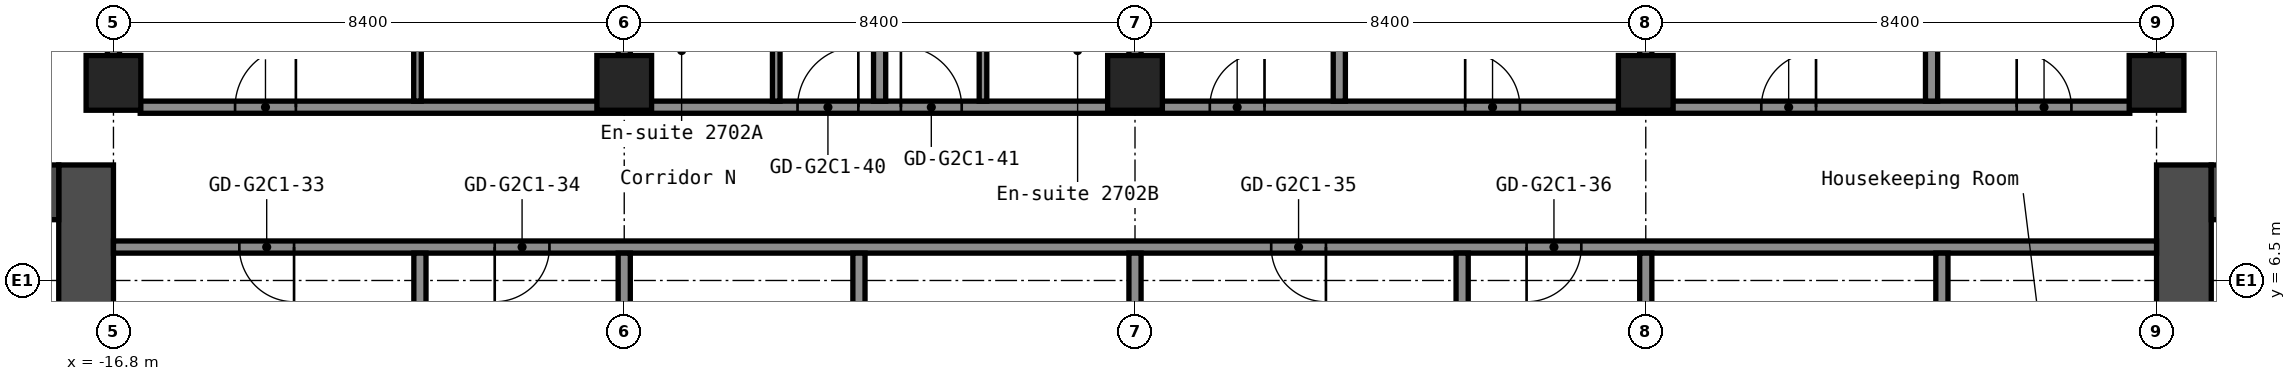
"""IFC4 building model, lengths in metres.
Left out: names, types, materials, properties, quantities, classifications, styles, units other than length and angle.
Written with IfcOpenShell. Run it as: python <this file> out.ifc"""

import sys

from ifc_helpers import new_model, si_unit, direction, frame, frame_2d, origin, origin_2d, place, context, subcontext, project, spatial, rectangle, hollow_rectangle, extrude, element, fill, save


model = new_model("IFC4")
c1 = context("Model", 3, precision=1e-05, world=origin(), true_north=direction((0.0, 1.0)))
c2 = subcontext(c1, "Body", "Model", "MODEL_VIEW")
j1 = project(units=[si_unit("LENGTHUNIT", "METRE"), si_unit("PLANEANGLEUNIT", "RADIAN")], contexts=[c1])
p1 = place(None, origin())
s1 = spatial("IfcSite", under=j1, at=p1, CompositionType="ELEMENT")
p2 = place(p1, origin())
s2 = spatial("IfcBuilding", under=s1, at=p2, CompositionType="ELEMENT")
p3 = place(p2, frame((0.0, 0.0, 97.8)))
s3 = spatial("IfcBuildingStorey", under=s2, at=p3, CompositionType="ELEMENT", Elevation=97.8)
for number, where, z_axis, x_axis in (
    (1, (-16.8, 9.75, 0.0), (0.0, 0.0, 1.0), (1.0, 0.0, 0.0)),
    (2, (-8.4, 9.75, 0.0), (0.0, 0.0, 1.0), (1.0, 0.0, 0.0)),
    (3, (0.0, 9.75, 0.0), (0.0, 0.0, 1.0), (1.0, 0.0, 0.0)),
    (4, (8.4, 9.75, 0.0), (0.0, 0.0, 1.0), (1.0, 0.0, 0.0)),
    (5, (16.8, 9.75, 0.0), (0.0, 0.0, 1.0), (1.0, 0.0, 0.0)),
):
    element("IfcColumn", number, at=place(p3, frame(where, z_axis=z_axis, x_axis=x_axis)), inside=s3, PredefinedType="COLUMN", context=c2, shape_type="SweptSolid", body=[
        extrude(hollow_rectangle(XDim=0.9, YDim=0.9, WallThickness=0.036, at=origin_2d()), origin(), (0.0, 0.0, 1.0), 2.8),
    ])
p4 = place(p3, frame((-17.25, -8.4, 0.0), z_axis=(0.0, 0.0, 1.0), x_axis=(0.0, 1.0, 0.0)))
e6 = element("IfcWall", 6, at=p4, inside=s3, PredefinedType="SHEAR", context=c2, shape_type="SweptSolid", body=[
    extrude(rectangle(XDim=16.8, YDim=0.9, at=frame_2d((8.4, 0.0))), origin(), (0.0, 0.0, 1.0), 2.8),
])
p5 = place(p4, frame((7.6, 0.0, 0.0)))
e7 = element("IfcOpeningElement", 7, at=p5, cuts=e6, PredefinedType="OPENING", context=c2, shape_type="SweptSolid", body=[
    extrude(rectangle(XDim=1.2, YDim=2.1, at=frame_2d((0.6, 1.05))), frame((0.0, 0.46, 0.0), z_axis=(0.0, -1.0, 0.0), x_axis=(1.0, 0.0, 0.0)), (0.0, 0.0, 1.0), 0.92),
])
p6 = place(p3, frame((-32.7, 7.95, 0.0), z_axis=(0.0, 0.0, 1.0), x_axis=(1.0, 0.0, 0.0)))
e8 = element("IfcWall", 8, at=p6, inside=s3, PredefinedType="SHEAR", context=c2, shape_type="SweptSolid", body=[
    extrude(rectangle(XDim=15.0, YDim=0.9, at=frame_2d((7.5, 0.0))), origin(), (0.0, 0.0, 1.0), 2.8),
])
p7 = place(p6, frame((3.4, 0.0, 0.0)))
e9 = element("IfcOpeningElement", 9, at=p7, cuts=e8, PredefinedType="OPENING", context=c2, shape_type="SweptSolid", body=[
    extrude(rectangle(XDim=1.2, YDim=2.1, at=frame_2d((0.6, 1.05))), frame((0.0, 0.46, 0.0), z_axis=(0.0, -1.0, 0.0), x_axis=(1.0, 0.0, 0.0)), (0.0, 0.0, 1.0), 0.92),
])
p8 = place(p6, frame((0.75, 0.0, 0.0)))
e10 = element("IfcOpeningElement", 10, at=p8, cuts=e8, PredefinedType="OPENING", context=c2, shape_type="SweptSolid", body=[
    extrude(rectangle(XDim=0.9, YDim=2.1, at=frame_2d((0.45, 1.05))), frame((0.0, 0.46, 0.0), z_axis=(0.0, -1.0, 0.0), x_axis=(1.0, 0.0, 0.0)), (0.0, 0.0, 1.0), 0.92),
])
p9 = place(p3, frame((17.25, -8.4, 0.0), z_axis=(0.0, 0.0, 1.0), x_axis=(0.0, 1.0, 0.0)))
e11 = element("IfcWall", 11, at=p9, inside=s3, PredefinedType="SHEAR", context=c2, shape_type="SweptSolid", body=[
    extrude(rectangle(XDim=16.8, YDim=0.9, at=frame_2d((8.4, 0.0))), origin(), (0.0, 0.0, 1.0), 2.8),
])
p10 = place(p9, frame((7.6, 0.0, 0.0)))
e12 = element("IfcOpeningElement", 12, at=p10, cuts=e11, PredefinedType="OPENING", context=c2, shape_type="SweptSolid", body=[
    extrude(rectangle(XDim=1.2, YDim=2.1, at=frame_2d((0.6, 1.05))), frame((0.0, 0.46, 0.0), z_axis=(0.0, -1.0, 0.0), x_axis=(1.0, 0.0, 0.0)), (0.0, 0.0, 1.0), 0.92),
])
p11 = place(p3, frame((17.7, 7.95, 0.0), z_axis=(0.0, 0.0, 1.0), x_axis=(1.0, 0.0, 0.0)))
e13 = element("IfcWall", 13, at=p11, inside=s3, PredefinedType="SHEAR", context=c2, shape_type="SweptSolid", body=[
    extrude(rectangle(XDim=15.0, YDim=0.9, at=frame_2d((7.5, 0.0))), origin(), (0.0, 0.0, 1.0), 2.8),
])
p12 = place(p11, frame((10.4, 0.0, 0.0)))
e14 = element("IfcOpeningElement", 14, at=p12, cuts=e13, PredefinedType="OPENING", context=c2, shape_type="SweptSolid", body=[
    extrude(rectangle(XDim=1.2, YDim=2.1, at=frame_2d((0.6, 1.05))), frame((0.0, 0.46, 0.0), z_axis=(0.0, -1.0, 0.0), x_axis=(1.0, 0.0, 0.0)), (0.0, 0.0, 1.0), 0.92),
])
p13 = place(p11, frame((13.35, 0.0, 0.0)))
e15 = element("IfcOpeningElement", 15, at=p13, cuts=e13, PredefinedType="OPENING", context=c2, shape_type="SweptSolid", body=[
    extrude(rectangle(XDim=0.9, YDim=2.1, at=frame_2d((0.45, 1.05))), frame((0.0, 0.46, 0.0), z_axis=(0.0, -1.0, 0.0), x_axis=(1.0, 0.0, 0.0)), (0.0, 0.0, 1.0), 0.92),
])
p14 = place(p3, frame((-16.8, 7.05, 0.0), z_axis=(0.0, 0.0, 1.0), x_axis=(1.0, 0.0, 0.0)))
e16 = element("IfcWall", 16, at=p14, inside=s3, PredefinedType="PARTITIONING", context=c2, shape_type="SweptSolid", body=[
    extrude(rectangle(XDim=33.6, YDim=0.2, at=frame_2d((16.8, 0.0))), origin(), (0.0, 0.0, 1.0), 2.8),
])
p15 = place(p14, frame((2.07, 0.0, 0.0)))
e17 = element("IfcOpeningElement", 17, at=p15, cuts=e16, PredefinedType="OPENING", context=c2, shape_type="SweptSolid", body=[
    extrude(rectangle(XDim=0.9, YDim=2.1, at=frame_2d((0.45, 1.05))), frame((0.0, 0.11, 0.0), z_axis=(0.0, -1.0, 0.0), x_axis=(1.0, 0.0, 0.0)), (0.0, 0.0, 1.0), 0.22),
])
p16 = place(p14, frame((6.27, 0.0, 0.0)))
e18 = element("IfcOpeningElement", 18, at=p16, cuts=e16, PredefinedType="OPENING", context=c2, shape_type="SweptSolid", body=[
    extrude(rectangle(XDim=0.9, YDim=2.1, at=frame_2d((0.45, 1.05))), frame((0.0, 0.11, 0.0), z_axis=(0.0, -1.0, 0.0), x_axis=(1.0, 0.0, 0.0)), (0.0, 0.0, 1.0), 0.22),
])
p17 = place(p14, frame((19.04, 0.0, 0.0)))
e19 = element("IfcOpeningElement", 19, at=p17, cuts=e16, PredefinedType="OPENING", context=c2, shape_type="SweptSolid", body=[
    extrude(rectangle(XDim=0.9, YDim=2.1, at=frame_2d((0.45, 1.05))), frame((0.0, 0.11, 0.0), z_axis=(0.0, -1.0, 0.0), x_axis=(1.0, 0.0, 0.0)), (0.0, 0.0, 1.0), 0.22),
])
p18 = place(p14, frame((23.24, 0.0, 0.0)))
e20 = element("IfcOpeningElement", 20, at=p18, cuts=e16, PredefinedType="OPENING", context=c2, shape_type="SweptSolid", body=[
    extrude(rectangle(XDim=0.9, YDim=2.1, at=frame_2d((0.45, 1.05))), frame((0.0, 0.11, 0.0), z_axis=(0.0, -1.0, 0.0), x_axis=(1.0, 0.0, 0.0)), (0.0, 0.0, 1.0), 0.22),
])
p19 = place(p3, frame((-16.36, 9.35, 0.0), z_axis=(0.0, 0.0, 1.0), x_axis=(1.0, 0.0, 0.0)))
e21 = element("IfcWall", 21, at=p19, inside=s3, PredefinedType="PARTITIONING", context=c2, shape_type="SweptSolid", body=[
    extrude(rectangle(XDim=32.72, YDim=0.2, at=frame_2d((16.36, 0.0))), origin(), (0.0, 0.0, 1.0), 2.8),
])
p20 = place(p19, frame((1.56, 0.0, 0.0)))
e22 = element("IfcOpeningElement", 22, at=p20, cuts=e21, PredefinedType="OPENING", context=c2, shape_type="SweptSolid", body=[
    extrude(rectangle(XDim=1.0, YDim=2.1, at=frame_2d((0.5, 1.05))), frame((0.0, 0.11, 0.0), z_axis=(0.0, -1.0, 0.0), x_axis=(1.0, 0.0, 0.0)), (0.0, 0.0, 1.0), 0.22),
])
p21 = place(p19, frame((10.81, 0.0, 0.0)))
e23 = element("IfcOpeningElement", 23, at=p21, cuts=e21, PredefinedType="OPENING", context=c2, shape_type="SweptSolid", body=[
    extrude(rectangle(XDim=1.0, YDim=2.1, at=frame_2d((0.5, 1.05))), frame((0.0, 0.11, 0.0), z_axis=(0.0, -1.0, 0.0), x_axis=(1.0, 0.0, 0.0)), (0.0, 0.0, 1.0), 0.22),
])
p22 = place(p19, frame((12.51, 0.0, 0.0)))
e24 = element("IfcOpeningElement", 24, at=p22, cuts=e21, PredefinedType="OPENING", context=c2, shape_type="SweptSolid", body=[
    extrude(rectangle(XDim=1.0, YDim=2.1, at=frame_2d((0.5, 1.05))), frame((0.0, 0.11, 0.0), z_axis=(0.0, -1.0, 0.0), x_axis=(1.0, 0.0, 0.0)), (0.0, 0.0, 1.0), 0.22),
])
p23 = place(p19, frame((17.59, 0.0, 0.0)))
e25 = element("IfcOpeningElement", 25, at=p23, cuts=e21, PredefinedType="OPENING", context=c2, shape_type="SweptSolid", body=[
    extrude(rectangle(XDim=0.9, YDim=2.1, at=frame_2d((0.45, 1.05))), frame((0.0, 0.11, 0.0), z_axis=(0.0, -1.0, 0.0), x_axis=(1.0, 0.0, 0.0)), (0.0, 0.0, 1.0), 0.22),
])
p24 = place(p19, frame((21.79, 0.0, 0.0)))
e26 = element("IfcOpeningElement", 26, at=p24, cuts=e21, PredefinedType="OPENING", context=c2, shape_type="SweptSolid", body=[
    extrude(rectangle(XDim=0.9, YDim=2.1, at=frame_2d((0.45, 1.05))), frame((0.0, 0.11, 0.0), z_axis=(0.0, -1.0, 0.0), x_axis=(1.0, 0.0, 0.0)), (0.0, 0.0, 1.0), 0.22),
])
p25 = place(p19, frame((26.66, 0.0, 0.0)))
e27 = element("IfcOpeningElement", 27, at=p25, cuts=e21, PredefinedType="OPENING", context=c2, shape_type="SweptSolid", body=[
    extrude(rectangle(XDim=0.9, YDim=2.1, at=frame_2d((0.45, 1.05))), frame((0.0, 0.11, 0.0), z_axis=(0.0, -1.0, 0.0), x_axis=(1.0, 0.0, 0.0)), (0.0, 0.0, 1.0), 0.22),
])
p26 = place(p19, frame((30.86, 0.0, 0.0)))
e28 = element("IfcOpeningElement", 28, at=p26, cuts=e21, PredefinedType="OPENING", context=c2, shape_type="SweptSolid", body=[
    extrude(rectangle(XDim=0.9, YDim=2.1, at=frame_2d((0.45, 1.05))), frame((0.0, 0.11, 0.0), z_axis=(0.0, -1.0, 0.0), x_axis=(1.0, 0.0, 0.0)), (0.0, 0.0, 1.0), 0.22),
])
p27 = place(p3, frame((-16.8, 10.19, 0.0), z_axis=(0.0, 0.0, 1.0), x_axis=(0.0, 1.0, 0.0)))
e29 = element("IfcWall", 29, at=p27, inside=s3, PredefinedType="PARTITIONING", context=c2, shape_type="SweptSolid", body=[
    extrude(rectangle(XDim=13.36, YDim=0.2, at=frame_2d((6.68, 0.0))), origin(), (0.0, 0.0, 1.0), 2.8),
])
p28 = place(p3, frame((-11.8, 9.45, 0.0), z_axis=(0.0, 0.0, 1.0), x_axis=(0.0, 1.0, 0.0)))
e30 = element("IfcWall", 30, at=p28, inside=s3, PredefinedType="PARTITIONING", context=c2, shape_type="SweptSolid", body=[
    extrude(rectangle(XDim=3.3, YDim=0.125, at=frame_2d((1.65, 0.0))), origin(), (0.0, 0.0, 1.0), 2.8),
])
for number, where, z_axis, x_axis in (
    (31, (-11.76, 1.05, 0.0), (0.0, 0.0, 1.0), (0.0, 1.0, 0.0)),
    (32, (-8.4, 1.05, 0.0), (0.0, 0.0, 1.0), (0.0, 1.0, 0.0)),
):
    element("IfcWall", number, at=place(p3, frame(where, z_axis=z_axis, x_axis=x_axis)), inside=s3, PredefinedType="PARTITIONING", context=c2, shape_type="SweptSolid", body=[
        extrude(rectangle(XDim=5.9, YDim=0.2, at=frame_2d((2.95, 0.0))), origin(), (0.0, 0.0, 1.0), 2.8),
    ])
p29 = place(p3, frame((-8.4, 10.19, 0.0), z_axis=(0.0, 0.0, 1.0), x_axis=(0.0, 1.0, 0.0)))
e33 = element("IfcWall", 33, at=p29, inside=s3, PredefinedType="PARTITIONING", context=c2, shape_type="SweptSolid", body=[
    extrude(rectangle(XDim=13.36, YDim=0.2, at=frame_2d((6.68, 0.0))), origin(), (0.0, 0.0, 1.0), 2.8),
])
p30 = place(p3, frame((-5.9, 9.45, 0.0), z_axis=(0.0, 0.0, 1.0), x_axis=(0.0, 1.0, 0.0)))
e34 = element("IfcWall", 34, at=p30, inside=s3, PredefinedType="PARTITIONING", context=c2, shape_type="SweptSolid", body=[
    extrude(rectangle(XDim=2.9, YDim=0.125, at=frame_2d((1.45, 0.0))), origin(), (0.0, 0.0, 1.0), 2.8),
])
p31 = place(p30, frame((1.5, 0.0, 0.0)))
e35 = element("IfcOpeningElement", 35, at=p31, cuts=e34, PredefinedType="OPENING", context=c2, shape_type="SweptSolid", body=[
    extrude(rectangle(XDim=0.8, YDim=2.1, at=frame_2d((0.4, 1.05))), frame((0.0, 0.073, 0.0), z_axis=(0.0, -1.0, 0.0), x_axis=(1.0, 0.0, 0.0)), (0.0, 0.0, 1.0), 0.145),
])
p32 = place(p3, frame((-4.54, 1.05, 0.0), z_axis=(0.0, 0.0, 1.0), x_axis=(0.0, 1.0, 0.0)))
e36 = element("IfcWall", 36, at=p32, inside=s3, PredefinedType="PARTITIONING", context=c2, shape_type="SweptSolid", body=[
    extrude(rectangle(XDim=5.9, YDim=0.2, at=frame_2d((2.95, 0.0))), origin(), (0.0, 0.0, 1.0), 2.8),
])
p33 = place(p3, frame((-4.2, 9.45, 0.0), z_axis=(0.0, 0.0, 1.0), x_axis=(0.0, 1.0, 0.0)))
e37 = element("IfcWall", 37, at=p33, inside=s3, PredefinedType="PARTITIONING", context=c2, shape_type="SweptSolid", body=[
    extrude(rectangle(XDim=14.1, YDim=0.2, at=frame_2d((7.05, 0.0))), origin(), (0.0, 0.0, 1.0), 2.8),
])
p34 = place(p3, frame((-2.5, 9.45, 0.0), z_axis=(0.0, 0.0, 1.0), x_axis=(0.0, 1.0, 0.0)))
e38 = element("IfcWall", 38, at=p34, inside=s3, PredefinedType="PARTITIONING", context=c2, shape_type="SweptSolid", body=[
    extrude(rectangle(XDim=2.9, YDim=0.125, at=frame_2d((1.45, 0.0))), origin(), (0.0, 0.0, 1.0), 2.8),
])
p35 = place(p34, frame((1.5, 0.0, 0.0)))
e39 = element("IfcOpeningElement", 39, at=p35, cuts=e38, PredefinedType="OPENING", context=c2, shape_type="SweptSolid", body=[
    extrude(rectangle(XDim=0.8, YDim=2.1, at=frame_2d((0.4, 1.05))), frame((0.0, 0.073, 0.0), z_axis=(0.0, -1.0, 0.0), x_axis=(1.0, 0.0, 0.0)), (0.0, 0.0, 1.0), 0.145),
])
p36 = place(p3, frame((0.0, 1.05, 0.0), z_axis=(0.0, 0.0, 1.0), x_axis=(0.0, 1.0, 0.0)))
e40 = element("IfcWall", 40, at=p36, inside=s3, PredefinedType="PARTITIONING", context=c2, shape_type="SweptSolid", body=[
    extrude(rectangle(XDim=5.9, YDim=0.2, at=frame_2d((2.95, 0.0))), origin(), (0.0, 0.0, 1.0), 2.8),
])
p37 = place(p3, frame((0.0, 10.19, 0.0), z_axis=(0.0, 0.0, 1.0), x_axis=(0.0, 1.0, 0.0)))
e41 = element("IfcWall", 41, at=p37, inside=s3, PredefinedType="PARTITIONING", context=c2, shape_type="SweptSolid", body=[
    extrude(rectangle(XDim=13.36, YDim=0.2, at=frame_2d((6.68, 0.0))), origin(), (0.0, 0.0, 1.0), 2.8),
])
p38 = place(p3, frame((3.36, 9.45, 0.0), z_axis=(0.0, 0.0, 1.0), x_axis=(0.0, 1.0, 0.0)))
e42 = element("IfcWall", 42, at=p38, inside=s3, PredefinedType="PARTITIONING", context=c2, shape_type="SweptSolid", body=[
    extrude(rectangle(XDim=14.1, YDim=0.2, at=frame_2d((7.05, 0.0))), origin(), (0.0, 0.0, 1.0), 2.8),
])
for number, where, z_axis, x_axis in (
    (43, (5.38, 1.05, 0.0), (0.0, 0.0, 1.0), (0.0, 1.0, 0.0)),
    (44, (8.4, 1.05, 0.0), (0.0, 0.0, 1.0), (0.0, 1.0, 0.0)),
):
    element("IfcWall", number, at=place(p3, frame(where, z_axis=z_axis, x_axis=x_axis)), inside=s3, PredefinedType="PARTITIONING", context=c2, shape_type="SweptSolid", body=[
        extrude(rectangle(XDim=5.9, YDim=0.2, at=frame_2d((2.95, 0.0))), origin(), (0.0, 0.0, 1.0), 2.8),
    ])
p39 = place(p3, frame((8.4, 10.19, 0.0), z_axis=(0.0, 0.0, 1.0), x_axis=(0.0, 1.0, 0.0)))
e45 = element("IfcWall", 45, at=p39, inside=s3, PredefinedType="PARTITIONING", context=c2, shape_type="SweptSolid", body=[
    extrude(rectangle(XDim=13.36, YDim=0.2, at=frame_2d((6.68, 0.0))), origin(), (0.0, 0.0, 1.0), 2.8),
])
p40 = place(p3, frame((13.1, 9.45, 0.0), z_axis=(0.0, 0.0, 1.0), x_axis=(0.0, 1.0, 0.0)))
e46 = element("IfcWall", 46, at=p40, inside=s3, PredefinedType="PARTITIONING", context=c2, shape_type="SweptSolid", body=[
    extrude(rectangle(XDim=14.1, YDim=0.2, at=frame_2d((7.05, 0.0))), origin(), (0.0, 0.0, 1.0), 2.8),
])
p41 = place(p3, frame((13.27, 1.05, 0.0), z_axis=(0.0, 0.0, 1.0), x_axis=(0.0, 1.0, 0.0)))
e47 = element("IfcWall", 47, at=p41, inside=s3, PredefinedType="PARTITIONING", context=c2, shape_type="SweptSolid", body=[
    extrude(rectangle(XDim=5.9, YDim=0.2, at=frame_2d((2.95, 0.0))), origin(), (0.0, 0.0, 1.0), 2.8),
])
p42 = place(p3, frame((16.8, 10.19, 0.0), z_axis=(0.0, 0.0, 1.0), x_axis=(0.0, 1.0, 0.0)))
e48 = element("IfcWall", 48, at=p42, inside=s3, PredefinedType="PARTITIONING", context=c2, shape_type="SweptSolid", body=[
    extrude(rectangle(XDim=13.36, YDim=0.2, at=frame_2d((6.68, 0.0))), origin(), (0.0, 0.0, 1.0), 2.8),
])
p43 = place(p15, origin())
e49 = element("IfcDoor", 49, at=p43, inside=s3, OperationType="SINGLE_SWING_RIGHT", PredefinedType="DOOR", context=c2, shape_type="SweptSolid", body=[
    extrude(rectangle(XDim=0.9, YDim=2.1, at=frame_2d((0.45, 1.05))), frame((0.0, 0.025, 0.0), z_axis=(0.0, -1.0, 0.0), x_axis=(1.0, 0.0, 0.0)), (0.0, 0.0, 1.0), 0.05),
])
fill(e17, e49)
p44 = place(p16, origin())
e50 = element("IfcDoor", 50, at=p44, inside=s3, OperationType="SINGLE_SWING_LEFT", PredefinedType="DOOR", context=c2, shape_type="SweptSolid", body=[
    extrude(rectangle(XDim=0.9, YDim=2.1, at=frame_2d((0.45, 1.05))), frame((0.0, 0.025, 0.0), z_axis=(0.0, -1.0, 0.0), x_axis=(1.0, 0.0, 0.0)), (0.0, 0.0, 1.0), 0.05),
])
fill(e18, e50)
p45 = place(p17, origin())
e51 = element("IfcDoor", 51, at=p45, inside=s3, OperationType="SINGLE_SWING_RIGHT", PredefinedType="DOOR", context=c2, shape_type="SweptSolid", body=[
    extrude(rectangle(XDim=0.9, YDim=2.1, at=frame_2d((0.45, 1.05))), frame((0.0, 0.025, 0.0), z_axis=(0.0, -1.0, 0.0), x_axis=(1.0, 0.0, 0.0)), (0.0, 0.0, 1.0), 0.05),
])
fill(e19, e51)
p46 = place(p18, origin())
e52 = element("IfcDoor", 52, at=p46, inside=s3, OperationType="SINGLE_SWING_LEFT", PredefinedType="DOOR", context=c2, shape_type="SweptSolid", body=[
    extrude(rectangle(XDim=0.9, YDim=2.1, at=frame_2d((0.45, 1.05))), frame((0.0, 0.025, 0.0), z_axis=(0.0, -1.0, 0.0), x_axis=(1.0, 0.0, 0.0)), (0.0, 0.0, 1.0), 0.05),
])
fill(e20, e52)
p47 = place(p20, origin())
e53 = element("IfcDoor", 53, at=p47, inside=s3, OperationType="SINGLE_SWING_LEFT", PredefinedType="DOOR", context=c2, shape_type="SweptSolid", body=[
    extrude(rectangle(XDim=1.0, YDim=2.1, at=frame_2d((0.5, 1.05))), frame((0.0, 0.025, 0.0), z_axis=(0.0, -1.0, 0.0), x_axis=(1.0, 0.0, 0.0)), (0.0, 0.0, 1.0), 0.05),
])
fill(e22, e53)
p48 = place(p21, origin())
e54 = element("IfcDoor", 54, at=p48, inside=s3, OperationType="SINGLE_SWING_LEFT", PredefinedType="DOOR", context=c2, shape_type="SweptSolid", body=[
    extrude(rectangle(XDim=1.0, YDim=2.1, at=frame_2d((0.5, 1.05))), frame((0.0, 0.025, 0.0), z_axis=(0.0, -1.0, 0.0), x_axis=(1.0, 0.0, 0.0)), (0.0, 0.0, 1.0), 0.05),
])
fill(e23, e54)
p49 = place(p22, origin())
e55 = element("IfcDoor", 55, at=p49, inside=s3, OperationType="SINGLE_SWING_RIGHT", PredefinedType="DOOR", context=c2, shape_type="SweptSolid", body=[
    extrude(rectangle(XDim=1.0, YDim=2.1, at=frame_2d((0.5, 1.05))), frame((0.0, 0.025, 0.0), z_axis=(0.0, -1.0, 0.0), x_axis=(1.0, 0.0, 0.0)), (0.0, 0.0, 1.0), 0.05),
])
fill(e24, e55)
p50 = place(p23, origin())
e56 = element("IfcDoor", 56, at=p50, inside=s3, OperationType="SINGLE_SWING_LEFT", PredefinedType="DOOR", context=c2, shape_type="SweptSolid", body=[
    extrude(rectangle(XDim=0.9, YDim=2.1, at=frame_2d((0.45, 1.05))), frame((0.0, 0.025, 0.0), z_axis=(0.0, -1.0, 0.0), x_axis=(1.0, 0.0, 0.0)), (0.0, 0.0, 1.0), 0.05),
])
fill(e25, e56)
p51 = place(p24, origin())
e57 = element("IfcDoor", 57, at=p51, inside=s3, OperationType="SINGLE_SWING_RIGHT", PredefinedType="DOOR", context=c2, shape_type="SweptSolid", body=[
    extrude(rectangle(XDim=0.9, YDim=2.1, at=frame_2d((0.45, 1.05))), frame((0.0, 0.025, 0.0), z_axis=(0.0, -1.0, 0.0), x_axis=(1.0, 0.0, 0.0)), (0.0, 0.0, 1.0), 0.05),
])
fill(e26, e57)
p52 = place(p25, origin())
e58 = element("IfcDoor", 58, at=p52, inside=s3, OperationType="SINGLE_SWING_LEFT", PredefinedType="DOOR", context=c2, shape_type="SweptSolid", body=[
    extrude(rectangle(XDim=0.9, YDim=2.1, at=frame_2d((0.45, 1.05))), frame((0.0, 0.025, 0.0), z_axis=(0.0, -1.0, 0.0), x_axis=(1.0, 0.0, 0.0)), (0.0, 0.0, 1.0), 0.05),
])
fill(e27, e58)
p53 = place(p26, origin())
e59 = element("IfcDoor", 59, at=p53, inside=s3, OperationType="SINGLE_SWING_RIGHT", PredefinedType="DOOR", context=c2, shape_type="SweptSolid", body=[
    extrude(rectangle(XDim=0.9, YDim=2.1, at=frame_2d((0.45, 1.05))), frame((0.0, 0.025, 0.0), z_axis=(0.0, -1.0, 0.0), x_axis=(1.0, 0.0, 0.0)), (0.0, 0.0, 1.0), 0.05),
])
fill(e28, e59)
save(model, sys.argv[1])
